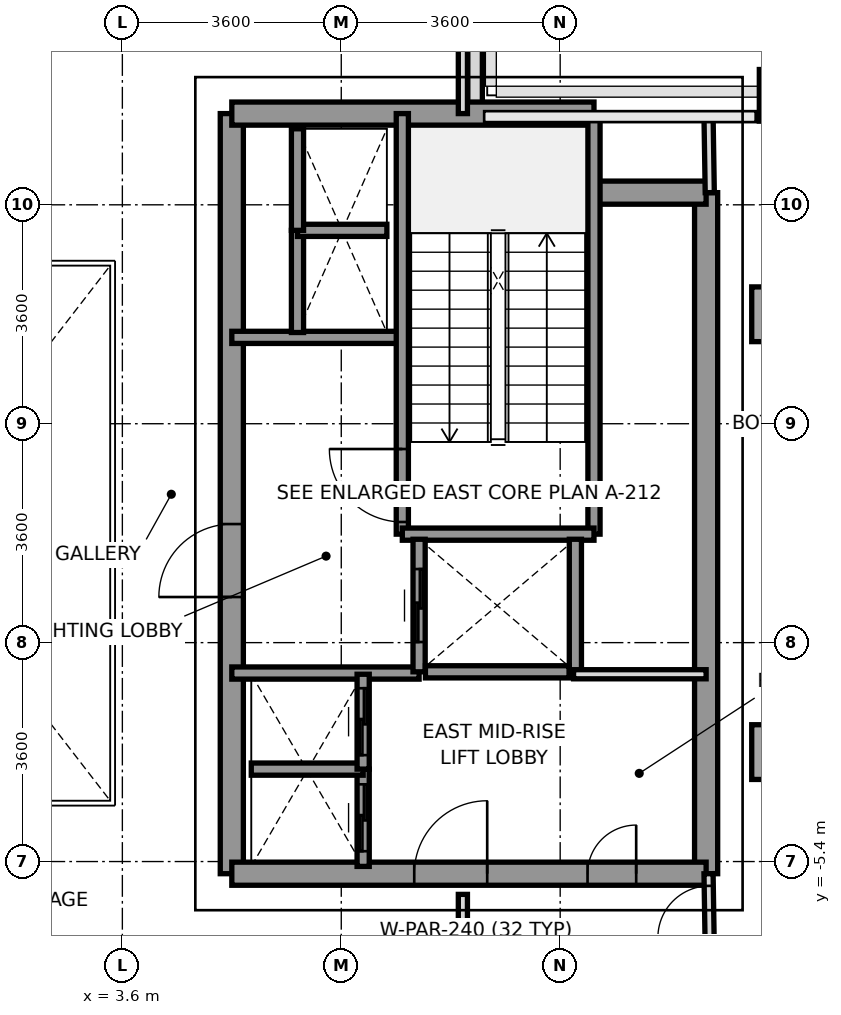
"""IFC4 building model, lengths in metres.
Left out: names, types, materials, properties, quantities, classifications, styles, units other than length and angle.
Written with IfcOpenShell. Run it as: python <this file> out.ifc"""

import sys

from ifc_helpers import new_model, si_unit, direction, frame, frame_2d, origin, origin_2d, place, context, subcontext, project, spatial, rectangle, extrude, source, transform, mapped, element, fill, save


model = new_model("IFC4")
c1 = context("Model", 3, precision=1e-05, world=origin(), true_north=direction((0.0, 1.0)))
c2 = subcontext(c1, "Body", "Model", "MODEL_VIEW")
j1 = project(units=[si_unit("LENGTHUNIT", "METRE"), si_unit("PLANEANGLEUNIT", "RADIAN")], contexts=[c1])
p1 = place(None, origin())
s1 = spatial("IfcSite", under=j1, at=p1, CompositionType="ELEMENT")
p2 = place(p1, origin())
s2 = spatial("IfcBuilding", under=s1, at=p2, CompositionType="ELEMENT")
p3 = place(p2, frame((0.0, 0.0, 156.2)))
s3 = spatial("IfcBuildingStorey", under=s2, at=p3, CompositionType="ELEMENT", Elevation=156.2)
m1 = source(origin(), c2, "Body", "SweptSolid", [
    extrude(rectangle(XDim=0.9, YDim=0.9, at=origin_2d()), origin(), (0.0, 0.0, 1.0), 4.0),
])
for number, where, z_axis, x_axis in (
    (1, (14.4, -3.6, 0.0), (0.0, 0.0, 1.0), (1.0, 0.0, 0.0)),
    (2, (14.4, 3.6, 0.0), (0.0, 0.0, 1.0), (1.0, 0.0, 0.0)),
):
    element("IfcColumn", number, at=place(p3, frame(where, z_axis=z_axis, x_axis=x_axis)), inside=s3, PredefinedType="COLUMN", context=c2, shape_type="MappedRepresentation", body=[
        mapped(m1, transform((0.0, 0.0, 0.0), x_axis=(1.0, 0.0, 0.0), y_axis=(0.0, 1.0, 0.0), z_axis=(0.0, 0.0, 1.0), scale=1.0)),
    ])
m2 = source(origin(), c2, "Body", "SweptSolid", [
    extrude(rectangle(XDim=0.65, YDim=0.85, at=origin_2d()), origin(), (0.0, 0.0, 1.0), 4.0),
])
p4 = place(p3, frame((14.4, 7.2, 0.0), z_axis=(0.0, 0.0, 1.0), x_axis=(1.0, 0.0, 0.0)))
e3 = element("IfcColumn", 3, at=p4, inside=s3, PredefinedType="COLUMN", context=c2, shape_type="MappedRepresentation", body=[
    mapped(m2, transform((0.0, 0.0, 0.0), x_axis=(1.0, 0.0, 0.0), y_axis=(0.0, 1.0, 0.0), z_axis=(0.0, 0.0, 1.0), scale=1.0)),
])
p5 = place(p3, frame((9.4, 8.547, 0.0), z_axis=(0.0, 0.0, 1.0), x_axis=(0.0, -1.0, 0.0)))
e4 = element("IfcWall", 4, at=p5, inside=s3, PredefinedType="PARAPET", context=c2, shape_type="SweptSolid", body=[
    extrude(rectangle(XDim=1.594, YDim=0.24, at=frame_2d((0.797, 0.0))), origin(), (0.0, 0.0, 1.0), 1.15),
])
p6 = place(p3, frame((13.2, -5.6, 0.0), z_axis=(0.0, 0.0, 1.0), x_axis=(0.0, 1.0, 0.0)))
e5 = element("IfcWall", 5, at=p6, inside=s3, PredefinedType="SHEAR", context=c2, shape_type="SweptSolid", body=[
    extrude(rectangle(XDim=11.2, YDim=0.38, at=frame_2d((5.6, 0.0))), origin(), (0.0, 0.0, 1.0), 4.0),
])
p7 = place(p3, frame((5.4, -5.6, 0.0), z_axis=(0.0, 0.0, 1.0), x_axis=(0.0, 1.0, 0.0)))
e6 = element("IfcWall", 6, at=p7, inside=s3, PredefinedType="SHEAR", context=c2, shape_type="SweptSolid", body=[
    extrude(rectangle(XDim=12.5, YDim=0.38, at=frame_2d((6.25, 0.0))), origin(), (0.0, 0.0, 1.0), 4.0),
])
p8 = place(p7, frame((4.55, 0.0, 0.0)))
e7 = element("IfcOpeningElement", 7, at=p8, cuts=e6, PredefinedType="OPENING", context=c2, shape_type="SweptSolid", body=[
    extrude(rectangle(XDim=1.2, YDim=2.2, at=frame_2d((0.6, 1.1))), frame((0.0, 0.2, 0.0), z_axis=(0.0, -1.0, 0.0), x_axis=(1.0, 0.0, 0.0)), (0.0, 0.0, 1.0), 0.4),
])
p9 = place(p3, frame((5.4, 6.9, 0.0), z_axis=(0.0, 0.0, 1.0), x_axis=(1.0, 0.0, 0.0)))
e8 = element("IfcWall", 8, at=p9, inside=s3, PredefinedType="SHEAR", context=c2, shape_type="SweptSolid", body=[
    extrude(rectangle(XDim=5.956, YDim=0.38, at=frame_2d((2.978, 0.0))), origin(), (0.0, 0.0, 1.0), 4.0),
])
p10 = place(p3, frame((11.356, 5.6, 0.0), z_axis=(0.0, 0.0, 1.0), x_axis=(1.0, 0.0, 0.0)))
e9 = element("IfcWall", 9, at=p10, inside=s3, PredefinedType="SHEAR", context=c2, shape_type="SweptSolid", body=[
    extrude(rectangle(XDim=1.844, YDim=0.38, at=frame_2d((0.922, 0.0))), origin(), (0.0, 0.0, 1.0), 4.0),
])
p11 = place(p3, frame((5.4, -5.6, 0.0), z_axis=(0.0, 0.0, 1.0), x_axis=(1.0, 0.0, 0.0)))
e10 = element("IfcWall", 10, at=p11, inside=s3, PredefinedType="SHEAR", context=c2, shape_type="SweptSolid", body=[
    extrude(rectangle(XDim=7.8, YDim=0.38, at=frame_2d((3.9, 0.0))), origin(), (0.0, 0.0, 1.0), 4.0),
])
p12 = place(p11, frame((3.0, 0.0, 0.0)))
e11 = element("IfcOpeningElement", 11, at=p12, cuts=e10, PredefinedType="OPENING", context=c2, shape_type="SweptSolid", body=[
    extrude(rectangle(XDim=1.2, YDim=2.2, at=frame_2d((0.6, 1.1))), frame((0.0, 0.2, 0.0), z_axis=(0.0, -1.0, 0.0), x_axis=(1.0, 0.0, 0.0)), (0.0, 0.0, 1.0), 0.4),
])
p13 = place(p11, frame((5.85, 0.0, 0.0)))
e12 = element("IfcOpeningElement", 12, at=p13, cuts=e10, PredefinedType="OPENING", context=c2, shape_type="SweptSolid", body=[
    extrude(rectangle(XDim=0.8, YDim=2.1, at=frame_2d((0.4, 1.05))), frame((0.0, 0.2, 0.0), z_axis=(0.0, -1.0, 0.0), x_axis=(1.0, 0.0, 0.0)), (0.0, 0.0, 1.0), 0.4),
])
p14 = place(p3, frame((5.4, 3.22, 0.0), z_axis=(0.0, 0.0, 1.0), x_axis=(1.0, 0.0, 0.0)))
e13 = element("IfcWall", 13, at=p14, inside=s3, PredefinedType="SOLIDWALL", context=c2, shape_type="SweptSolid", body=[
    extrude(rectangle(XDim=2.78, YDim=0.2, at=frame_2d((1.39, 0.0))), origin(), (0.0, 0.0, 1.0), 4.0),
])
p15 = place(p3, frame((5.4, -2.3, 0.0), z_axis=(0.0, 0.0, 1.0), x_axis=(1.0, 0.0, 0.0)))
e14 = element("IfcWall", 14, at=p15, inside=s3, PredefinedType="SOLIDWALL", context=c2, shape_type="SweptSolid", body=[
    extrude(rectangle(XDim=3.08, YDim=0.2, at=frame_2d((1.54, 0.0))), origin(), (0.0, 0.0, 1.0), 4.0),
])
p16 = place(p3, frame((8.204, -0.016, 0.0), z_axis=(0.0, 0.0, 1.0), x_axis=(0.0, 1.0, 0.0)))
e15 = element("IfcWall", 15, at=p16, inside=s3, PredefinedType="SOLIDWALL", context=c2, shape_type="SweptSolid", body=[
    extrude(rectangle(XDim=6.916, YDim=0.2, at=frame_2d((3.458, 0.0))), origin(), (0.0, 0.0, 1.0), 4.0),
])
p17 = place(p16, frame((0.2, 0.0, 0.0)))
e16 = element("IfcOpeningElement", 16, at=p17, cuts=e15, PredefinedType="OPENING", context=c2, shape_type="SweptSolid", body=[
    extrude(rectangle(XDim=1.2, YDim=2.2, at=frame_2d((0.6, 1.1))), frame((0.0, 0.11, 0.0), z_axis=(0.0, -1.0, 0.0), x_axis=(1.0, 0.0, 0.0)), (0.0, 0.0, 1.0), 0.22),
])
p18 = place(p3, frame((11.356, -0.016, 0.0), z_axis=(0.0, 0.0, 1.0), x_axis=(0.0, 1.0, 0.0)))
e17 = element("IfcWall", 17, at=p18, inside=s3, PredefinedType="SOLIDWALL", context=c2, shape_type="SweptSolid", body=[
    extrude(rectangle(XDim=6.916, YDim=0.2, at=frame_2d((3.458, 0.0))), origin(), (0.0, 0.0, 1.0), 4.0),
])
p19 = place(p3, frame((8.204, -0.016, 0.0), z_axis=(0.0, 0.0, 1.0), x_axis=(1.0, 0.0, 0.0)))
e18 = element("IfcWall", 18, at=p19, inside=s3, PredefinedType="SOLIDWALL", context=c2, shape_type="SweptSolid", body=[
    extrude(rectangle(XDim=3.152, YDim=0.2, at=frame_2d((1.576, 0.0))), origin(), (0.0, 0.0, 1.0), 4.0),
])
p20 = place(p3, frame((8.48, -2.28, 0.0), z_axis=(0.0, 0.0, 1.0), x_axis=(0.0, 1.0, 0.0)))
e19 = element("IfcWall", 19, at=p20, inside=s3, PredefinedType="SOLIDWALL", context=c2, shape_type="SweptSolid", body=[
    extrude(rectangle(XDim=2.18, YDim=0.2, at=frame_2d((1.09, 0.0))), origin(), (0.0, 0.0, 1.0), 4.0),
])
p21 = place(p20, frame((0.49, 0.0, 0.0)))
e20 = element("IfcOpeningElement", 20, at=p21, cuts=e19, PredefinedType="OPENING", context=c2, shape_type="SweptSolid", body=[
    extrude(rectangle(XDim=1.2, YDim=2.2, at=frame_2d((0.6, 1.1))), frame((0.0, 0.11, 0.0), z_axis=(0.0, -1.0, 0.0), x_axis=(1.0, 0.0, 0.0)), (0.0, 0.0, 1.0), 0.22),
])
p22 = place(p3, frame((11.05, -2.28, 0.0), z_axis=(0.0, 0.0, 1.0), x_axis=(0.0, 1.0, 0.0)))
e21 = element("IfcWall", 21, at=p22, inside=s3, PredefinedType="SOLIDWALL", context=c2, shape_type="SweptSolid", body=[
    extrude(rectangle(XDim=2.18, YDim=0.2, at=frame_2d((1.09, 0.0))), origin(), (0.0, 0.0, 1.0), 4.0),
])
p23 = place(p3, frame((8.584, -2.28, 0.0), z_axis=(0.0, 0.0, 1.0), x_axis=(1.0, 0.0, 0.0)))
e22 = element("IfcWall", 22, at=p23, inside=s3, PredefinedType="SOLIDWALL", context=c2, shape_type="SweptSolid", body=[
    extrude(rectangle(XDim=2.362, YDim=0.2, at=frame_2d((1.181, 0.0))), origin(), (0.0, 0.0, 1.0), 4.0),
])
p24 = place(p3, frame((7.56, -5.48, 0.0), z_axis=(0.0, 0.0, 1.0), x_axis=(0.0, 1.0, 0.0)))
e23 = element("IfcWall", 23, at=p24, inside=s3, PredefinedType="SOLIDWALL", context=c2, shape_type="SweptSolid", body=[
    extrude(rectangle(XDim=1.6, YDim=0.2, at=frame_2d((0.8, 0.0))), origin(), (0.0, 0.0, 1.0), 4.0),
])
p25 = place(p24, frame((0.25, 0.0, 0.0)))
e24 = element("IfcOpeningElement", 24, at=p25, cuts=e23, PredefinedType="OPENING", context=c2, shape_type="SweptSolid", body=[
    extrude(rectangle(XDim=1.1, YDim=2.2, at=frame_2d((0.55, 1.1))), frame((0.0, 0.11, 0.0), z_axis=(0.0, -1.0, 0.0), x_axis=(1.0, 0.0, 0.0)), (0.0, 0.0, 1.0), 0.22),
])
p26 = place(p3, frame((5.72, -3.88, 0.0), z_axis=(0.0, 0.0, 1.0), x_axis=(1.0, 0.0, 0.0)))
e25 = element("IfcWall", 25, at=p26, inside=s3, PredefinedType="SOLIDWALL", context=c2, shape_type="SweptSolid", body=[
    extrude(rectangle(XDim=1.84, YDim=0.2, at=frame_2d((0.92, 0.0))), origin(), (0.0, 0.0, 1.0), 4.0),
])
p27 = place(p3, frame((7.56, -3.88, 0.0), z_axis=(0.0, 0.0, 1.0), x_axis=(0.0, 1.0, 0.0)))
e26 = element("IfcWall", 26, at=p27, inside=s3, PredefinedType="SOLIDWALL", context=c2, shape_type="SweptSolid", body=[
    extrude(rectangle(XDim=1.56, YDim=0.2, at=frame_2d((0.78, 0.0))), origin(), (0.0, 0.0, 1.0), 4.0),
])
p28 = place(p27, frame((0.23, 0.0, 0.0)))
e27 = element("IfcOpeningElement", 27, at=p28, cuts=e26, PredefinedType="OPENING", context=c2, shape_type="SweptSolid", body=[
    extrude(rectangle(XDim=1.1, YDim=2.2, at=frame_2d((0.55, 1.1))), frame((0.0, 0.11, 0.0), z_axis=(0.0, -1.0, 0.0), x_axis=(1.0, 0.0, 0.0)), (0.0, 0.0, 1.0), 0.22),
])
p29 = place(p3, frame((6.48, 3.3, 0.0), z_axis=(0.0, 0.0, 1.0), x_axis=(0.0, 1.0, 0.0)))
e28 = element("IfcWall", 28, at=p29, inside=s3, PredefinedType="SOLIDWALL", context=c2, shape_type="SweptSolid", body=[
    extrude(rectangle(XDim=1.68, YDim=0.2, at=frame_2d((0.84, 0.0))), origin(), (0.0, 0.0, 1.0), 4.0),
])
p30 = place(p3, frame((6.48, 4.98, 0.0), z_axis=(0.0, 0.0, 1.0), x_axis=(1.0, 0.0, 0.0)))
e29 = element("IfcWall", 29, at=p30, inside=s3, PredefinedType="SOLIDWALL", context=c2, shape_type="SweptSolid", body=[
    extrude(rectangle(XDim=1.47, YDim=0.2, at=frame_2d((0.735, 0.0))), origin(), (0.0, 0.0, 1.0), 4.0),
])
p31 = place(p3, frame((6.48, 4.98, 0.0), z_axis=(0.0, 0.0, 1.0), x_axis=(0.0, 1.0, 0.0)))
e30 = element("IfcWall", 30, at=p31, inside=s3, PredefinedType="SOLIDWALL", context=c2, shape_type="SweptSolid", body=[
    extrude(rectangle(XDim=1.67, YDim=0.2, at=frame_2d((0.835, 0.0))), origin(), (0.0, 0.0, 1.0), 4.0),
])
p32 = place(p3, frame((11.02, -2.32, 0.0), z_axis=(0.0, 0.0, 1.0), x_axis=(1.0, 0.0, 0.0)))
e31 = element("IfcWall", 31, at=p32, inside=s3, PredefinedType="PARTITIONING", context=c2, shape_type="SweptSolid", body=[
    extrude(rectangle(XDim=2.18, YDim=0.15, at=frame_2d((1.09, 0.0))), origin(), (0.0, 0.0, 1.0), 4.0),
])
p33 = place(p3, frame((9.2, 6.9, 0.0), z_axis=(0.0, 0.0, 1.0), x_axis=(0.0, 1.0, 0.0)))
e32 = element("IfcWall", 32, at=p33, inside=s3, PredefinedType="PARTITIONING", context=c2, shape_type="SweptSolid", body=[
    extrude(rectangle(XDim=8.78, YDim=0.15, at=frame_2d((4.39, 0.0))), origin(), (0.0, 0.0, 1.0), 3.55),
])
p34 = place(p3, frame((9.2, -15.68, 0.0), z_axis=(0.0, 0.0, 1.0), x_axis=(0.0, 1.0, 0.0)))
e33 = element("IfcWall", 33, at=p34, inside=s3, PredefinedType="PARTITIONING", context=c2, shape_type="SweptSolid", body=[
    extrude(rectangle(XDim=9.74, YDim=0.15, at=frame_2d((4.87, 0.0))), origin(), (0.0, 0.0, 1.0), 3.55),
])
p35 = place(p3, frame((13.26, 5.6, 0.0), z_axis=(0.0, 0.0, 1.0), x_axis=(-0.016013571389, 0.999871774545, 0.0)))
e34 = element("IfcWall", 34, at=p35, inside=s3, PredefinedType="PARTITIONING", context=c2, shape_type="SweptSolid", body=[
    extrude(rectangle(XDim=1.25, YDim=0.15, at=frame_2d((0.625, 0.0))), origin(), (0.0, 0.0, 1.0), 4.0),
])
p36 = place(p3, frame((13.26, -6.85, 0.0), z_axis=(0.0, 0.0, 1.0), x_axis=(-0.016013571389, 0.999871774545, 0.0)))
e35 = element("IfcWall", 35, at=p36, inside=s3, PredefinedType="PARTITIONING", context=c2, shape_type="SweptSolid", body=[
    extrude(rectangle(XDim=1.25, YDim=0.15, at=frame_2d((0.625, 0.0))), origin(), (0.0, 0.0, 1.0), 4.0),
])
p37 = place(p36, frame((0.2, 0.0, 0.0)))
e36 = element("IfcOpeningElement", 36, at=p37, cuts=e35, PredefinedType="OPENING", context=c2, shape_type="SweptSolid", body=[
    extrude(rectangle(XDim=0.85, YDim=2.1, at=frame_2d((0.425, 1.05))), frame((0.0, 0.085, 0.0), z_axis=(0.0, -1.0, 0.0), x_axis=(1.0, 0.0, 0.0)), (0.0, 0.0, 1.0), 0.17),
])
m3 = source(origin(), c2, "Body", "SweptSolid", [
    extrude(rectangle(XDim=1.2, YDim=2.2, at=frame_2d((0.6, 1.1))), frame((0.0, 0.025, 0.0), z_axis=(0.0, -1.0, 0.0), x_axis=(1.0, 0.0, 0.0)), (0.0, 0.0, 1.0), 0.05),
])
p38 = place(p17, origin())
e37 = element("IfcDoor", 37, at=p38, inside=s3, OperationType="SINGLE_SWING_RIGHT", PredefinedType="DOOR", context=c2, shape_type="MappedRepresentation", body=[
    mapped(m3, transform((0.0, 0.0, 0.0), x_axis=(1.0, 0.0, 0.0), y_axis=(0.0, 1.0, 0.0), z_axis=(0.0, 0.0, 1.0), scale=1.0)),
])
fill(e16, e37)
p39 = place(p8, origin())
e38 = element("IfcDoor", 38, at=p39, inside=s3, OperationType="SINGLE_SWING_LEFT", PredefinedType="DOOR", context=c2, shape_type="MappedRepresentation", body=[
    mapped(m3, transform((0.0, 0.0, 0.0), x_axis=(1.0, 0.0, 0.0), y_axis=(0.0, 1.0, 0.0), z_axis=(0.0, 0.0, 1.0), scale=1.0)),
])
fill(e7, e38)
p40 = place(p12, origin())
e39 = element("IfcDoor", 39, at=p40, inside=s3, OperationType="SINGLE_SWING_RIGHT", PredefinedType="DOOR", context=c2, shape_type="MappedRepresentation", body=[
    mapped(m3, transform((0.0, 0.0, 0.0), x_axis=(1.0, 0.0, 0.0), y_axis=(0.0, 1.0, 0.0), z_axis=(0.0, 0.0, 1.0), scale=1.0)),
])
fill(e11, e39)
m4 = source(origin(), c2, "Body", "SweptSolid", [
    extrude(rectangle(XDim=0.8, YDim=2.1, at=frame_2d((0.4, 1.05))), frame((0.0, 0.025, 0.0), z_axis=(0.0, -1.0, 0.0), x_axis=(1.0, 0.0, 0.0)), (0.0, 0.0, 1.0), 0.05),
])
p41 = place(p13, origin())
e40 = element("IfcDoor", 40, at=p41, inside=s3, OperationType="SINGLE_SWING_RIGHT", PredefinedType="DOOR", context=c2, shape_type="MappedRepresentation", body=[
    mapped(m4, transform((0.0, 0.0, 0.0), x_axis=(1.0, 0.0, 0.0), y_axis=(0.0, 1.0, 0.0), z_axis=(0.0, 0.0, 1.0), scale=1.0)),
])
fill(e12, e40)
p42 = place(p21, origin())
e41 = element("IfcDoor", 41, at=p42, inside=s3, OperationType="SLIDING_TO_RIGHT", PredefinedType="DOOR", context=c2, shape_type="MappedRepresentation", body=[
    mapped(m3, transform((0.0, 0.0, 0.0), x_axis=(1.0, 0.0, 0.0), y_axis=(0.0, 1.0, 0.0), z_axis=(0.0, 0.0, 1.0), scale=1.0)),
])
fill(e20, e41)
m5 = source(origin(), c2, "Body", "SweptSolid", [
    extrude(rectangle(XDim=1.1, YDim=2.2, at=frame_2d((0.55, 1.1))), frame((0.0, 0.025, 0.0), z_axis=(0.0, -1.0, 0.0), x_axis=(1.0, 0.0, 0.0)), (0.0, 0.0, 1.0), 0.05),
])
p43 = place(p25, origin())
e42 = element("IfcDoor", 42, at=p43, inside=s3, OperationType="SLIDING_TO_LEFT", PredefinedType="DOOR", context=c2, shape_type="MappedRepresentation", body=[
    mapped(m5, transform((0.0, 0.0, 0.0), x_axis=(1.0, 0.0, 0.0), y_axis=(0.0, 1.0, 0.0), z_axis=(0.0, 0.0, 1.0), scale=1.0)),
])
fill(e24, e42)
p44 = place(p28, origin())
e43 = element("IfcDoor", 43, at=p44, inside=s3, OperationType="SLIDING_TO_LEFT", PredefinedType="DOOR", context=c2, shape_type="MappedRepresentation", body=[
    mapped(m5, transform((0.0, 0.0, 0.0), x_axis=(1.0, 0.0, 0.0), y_axis=(0.0, 1.0, 0.0), z_axis=(0.0, 0.0, 1.0), scale=1.0)),
])
fill(e27, e43)
m6 = source(origin(), c2, "Body", "SweptSolid", [
    extrude(rectangle(XDim=0.85, YDim=2.1, at=frame_2d((0.425, 1.05))), frame((0.0, 0.025, 0.0), z_axis=(0.0, -1.0, 0.0), x_axis=(1.0, 0.0, 0.0)), (0.0, 0.0, 1.0), 0.05),
])
p45 = place(p37, origin())
e44 = element("IfcDoor", 44, at=p45, inside=s3, OperationType="SINGLE_SWING_LEFT", PredefinedType="DOOR", context=c2, shape_type="MappedRepresentation", body=[
    mapped(m6, transform((0.0, 0.0, 0.0), x_axis=(1.0, 0.0, 0.0), y_axis=(0.0, 1.0, 0.0), z_axis=(0.0, 0.0, 1.0), scale=1.0)),
])
fill(e36, e44)
save(model, sys.argv[1])
